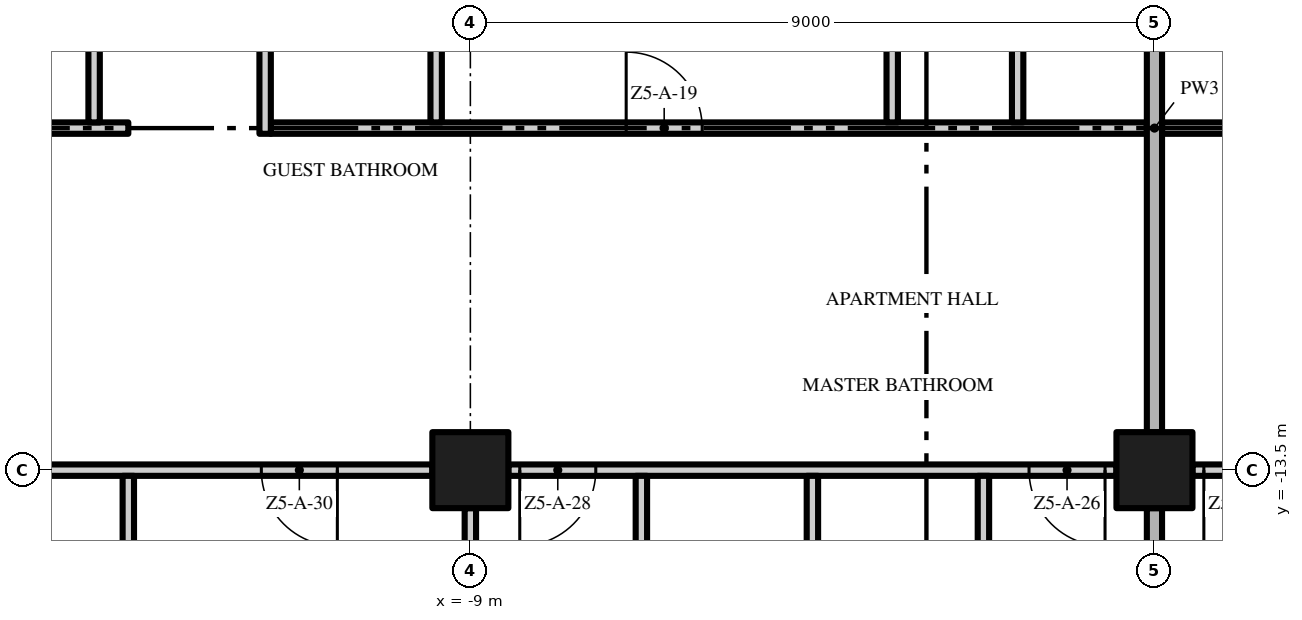
"""IFC4 building model, lengths in metres.
Left out: names, types, materials, properties, quantities, classifications, styles, units other than length and angle.
Written with IfcOpenShell. Run it as: python <this file> out.ifc"""

import sys

from ifc_helpers import new_model, si_unit, direction, frame, frame_2d, origin, origin_2d, place, context, subcontext, project, spatial, rectangle, extrude, element, fill, save


model = new_model("IFC4")
c1 = context("Model", 3, precision=1e-05, world=origin(), true_north=direction((0.0, 1.0)))
c2 = subcontext(c1, "Body", "Model", "MODEL_VIEW")
j1 = project(units=[si_unit("LENGTHUNIT", "METRE"), si_unit("PLANEANGLEUNIT", "RADIAN")], contexts=[c1])
p1 = place(None, origin())
s1 = spatial("IfcSite", under=j1, at=p1, CompositionType="ELEMENT")
p2 = place(p1, origin())
s2 = spatial("IfcBuilding", under=s1, at=p2, CompositionType="ELEMENT")
p3 = place(p2, frame((0.0, 0.0, 242.6)))
s3 = spatial("IfcBuildingStorey", under=s2, at=p3, CompositionType="ELEMENT", Elevation=242.6)
for number, where, z_axis, x_axis in (
    (1, (-9.0, -13.5, 0.0), (0.0, 0.0, 1.0), (1.0, 0.0, 0.0)),
    (2, (0.0, -13.5, 0.0), (0.0, 0.0, 1.0), (1.0, 0.0, 0.0)),
):
    element("IfcColumn", number, at=place(p3, frame(where, z_axis=z_axis, x_axis=x_axis)), inside=s3, PredefinedType="COLUMN", context=c2, shape_type="SweptSolid", body=[
        extrude(rectangle(XDim=1.0, YDim=1.0, at=origin_2d()), origin(), (0.0, 0.0, 1.0), 3.5),
    ])
p4 = place(p3, frame((-9.5, -13.5, 0.0), z_axis=(0.0, 0.0, 1.0), x_axis=(-1.0, 0.0, 0.0)))
e3 = element("IfcWall", 3, at=p4, inside=s3, PredefinedType="PARTITIONING", context=c2, shape_type="SweptSolid", body=[
    extrude(rectangle(XDim=8.0, YDim=0.15, at=frame_2d((4.0, 0.0))), origin(), (0.0, 0.0, 1.0), 3.5),
])
p5 = place(p4, frame((1.25, 0.0, 0.0)))
e4 = element("IfcOpeningElement", 4, at=p5, cuts=e3, PredefinedType="OPENING", context=c2, shape_type="SweptSolid", body=[
    extrude(rectangle(XDim=1.0, YDim=2.4, at=frame_2d((0.5, 1.2))), frame((0.0, 0.085, 0.0), z_axis=(0.0, -1.0, 0.0), x_axis=(1.0, 0.0, 0.0)), (0.0, 0.0, 1.0), 0.17),
])
p6 = place(p4, frame((6.85, 0.0, 0.0)))
e5 = element("IfcOpeningElement", 5, at=p6, cuts=e3, PredefinedType="OPENING", context=c2, shape_type="SweptSolid", body=[
    extrude(rectangle(XDim=1.0, YDim=2.4, at=frame_2d((0.5, 1.2))), frame((0.0, 0.085, 0.0), z_axis=(0.0, -1.0, 0.0), x_axis=(1.0, 0.0, 0.0)), (0.0, 0.0, 1.0), 0.17),
])
p7 = place(p3, frame((-0.5, -13.5, 0.0), z_axis=(0.0, 0.0, 1.0), x_axis=(-1.0, 0.0, 0.0)))
e6 = element("IfcWall", 6, at=p7, inside=s3, PredefinedType="PARTITIONING", context=c2, shape_type="SweptSolid", body=[
    extrude(rectangle(XDim=8.0, YDim=0.15, at=frame_2d((4.0, 0.0))), origin(), (0.0, 0.0, 1.0), 3.5),
])
p8 = place(p7, frame((0.15, 0.0, 0.0)))
e7 = element("IfcOpeningElement", 7, at=p8, cuts=e6, PredefinedType="OPENING", context=c2, shape_type="SweptSolid", body=[
    extrude(rectangle(XDim=1.0, YDim=2.4, at=frame_2d((0.5, 1.2))), frame((0.0, 0.085, 0.0), z_axis=(0.0, -1.0, 0.0), x_axis=(1.0, 0.0, 0.0)), (0.0, 0.0, 1.0), 0.17),
])
p9 = place(p7, frame((6.85, 0.0, 0.0)))
e8 = element("IfcOpeningElement", 8, at=p9, cuts=e6, PredefinedType="OPENING", context=c2, shape_type="SweptSolid", body=[
    extrude(rectangle(XDim=1.0, YDim=2.4, at=frame_2d((0.5, 1.2))), frame((0.0, 0.085, 0.0), z_axis=(0.0, -1.0, 0.0), x_axis=(1.0, 0.0, 0.0)), (0.0, 0.0, 1.0), 0.17),
])
p10 = place(p3, frame((8.5, -13.5, 0.0), z_axis=(0.0, 0.0, 1.0), x_axis=(-1.0, 0.0, 0.0)))
e9 = element("IfcWall", 9, at=p10, inside=s3, PredefinedType="PARTITIONING", context=c2, shape_type="SweptSolid", body=[
    extrude(rectangle(XDim=8.0, YDim=0.15, at=frame_2d((4.0, 0.0))), origin(), (0.0, 0.0, 1.0), 3.5),
])
p11 = place(p10, frame((1.25, 0.0, 0.0)))
e10 = element("IfcOpeningElement", 10, at=p11, cuts=e9, PredefinedType="OPENING", context=c2, shape_type="SweptSolid", body=[
    extrude(rectangle(XDim=1.0, YDim=2.4, at=frame_2d((0.5, 1.2))), frame((0.0, 0.085, 0.0), z_axis=(0.0, -1.0, 0.0), x_axis=(1.0, 0.0, 0.0)), (0.0, 0.0, 1.0), 0.17),
])
p12 = place(p10, frame((6.85, 0.0, 0.0)))
e11 = element("IfcOpeningElement", 11, at=p12, cuts=e9, PredefinedType="OPENING", context=c2, shape_type="SweptSolid", body=[
    extrude(rectangle(XDim=1.0, YDim=2.4, at=frame_2d((0.5, 1.2))), frame((0.0, 0.085, 0.0), z_axis=(0.0, -1.0, 0.0), x_axis=(1.0, 0.0, 0.0)), (0.0, 0.0, 1.0), 0.17),
])
p13 = place(p3, frame((-26.7, -9.0, 0.0), z_axis=(0.0, 0.0, 1.0), x_axis=(1.0, 0.0, 0.0)))
e12 = element("IfcWall", 12, at=p13, inside=s3, PredefinedType="PARTITIONING", context=c2, shape_type="SweptSolid", body=[
    extrude(rectangle(XDim=13.2, YDim=0.15, at=frame_2d((6.6, 0.0))), origin(), (0.0, 0.0, 1.0), 3.5),
])
p14 = place(p3, frame((-11.625, -9.0, 0.0), z_axis=(0.0, 0.0, 1.0), x_axis=(1.0, 0.0, 0.0)))
e13 = element("IfcWall", 13, at=p14, inside=s3, PredefinedType="PARTITIONING", context=c2, shape_type="SweptSolid", body=[
    extrude(rectangle(XDim=11.525, YDim=0.15, at=frame_2d((5.763, 0.0))), origin(), (0.0, 0.0, 1.0), 3.5),
])
p15 = place(p14, frame((4.675, 0.0, 0.0)))
e14 = element("IfcOpeningElement", 14, at=p15, cuts=e13, PredefinedType="OPENING", context=c2, shape_type="SweptSolid", body=[
    extrude(rectangle(XDim=1.0, YDim=2.4, at=frame_2d((0.5, 1.2))), frame((0.0, 0.085, 0.0), z_axis=(0.0, -1.0, 0.0), x_axis=(1.0, 0.0, 0.0)), (0.0, 0.0, 1.0), 0.17),
])
p16 = place(p3, frame((0.1, -9.0, 0.0), z_axis=(0.0, 0.0, 1.0), x_axis=(1.0, 0.0, 0.0)))
e15 = element("IfcWall", 15, at=p16, inside=s3, PredefinedType="PARTITIONING", context=c2, shape_type="SweptSolid", body=[
    extrude(rectangle(XDim=8.825, YDim=0.15, at=frame_2d((4.412, 0.0))), origin(), (0.0, 0.0, 1.0), 3.5),
])
p17 = place(p16, frame((5.8, 0.0, 0.0)))
e16 = element("IfcOpeningElement", 16, at=p17, cuts=e15, PredefinedType="OPENING", context=c2, shape_type="SweptSolid", body=[
    extrude(rectangle(XDim=0.9, YDim=2.1, at=frame_2d((0.45, 1.05))), frame((0.0, 0.085, 0.0), z_axis=(0.0, -1.0, 0.0), x_axis=(1.0, 0.0, 0.0)), (0.0, 0.0, 1.0), 0.17),
])
p18 = place(p3, frame((-13.95, -8.925, 0.0), z_axis=(0.0, 0.0, 1.0), x_axis=(0.0, 1.0, 0.0)))
e17 = element("IfcWall", 17, at=p18, inside=s3, PredefinedType="PARTITIONING", context=c2, shape_type="SweptSolid", body=[
    extrude(rectangle(XDim=4.5, YDim=0.15, at=frame_2d((2.25, 0.0))), origin(), (0.0, 0.0, 1.0), 3.5),
])
p19 = place(p3, frame((-13.5, -22.2, 0.0), z_axis=(0.0, 0.0, 1.0), x_axis=(0.0, 1.0, 0.0)))
e18 = element("IfcWall", 18, at=p19, inside=s3, PredefinedType="PARTITIONING", context=c2, shape_type="SweptSolid", body=[
    extrude(rectangle(XDim=8.625, YDim=0.15, at=frame_2d((4.312, 0.0))), origin(), (0.0, 0.0, 1.0), 3.5),
])
p20 = place(p3, frame((-11.7, -4.425, 0.0), z_axis=(0.0, 0.0, 1.0), x_axis=(0.0, -1.0, 0.0)))
e19 = element("IfcWall", 19, at=p20, inside=s3, PredefinedType="PARTITIONING", context=c2, shape_type="SweptSolid", body=[
    extrude(rectangle(XDim=4.65, YDim=0.15, at=frame_2d((2.325, 0.0))), origin(), (0.0, 0.0, 1.0), 3.5),
])
p21 = place(p20, frame((1.875, 0.0, 0.0)))
e20 = element("IfcOpeningElement", 20, at=p21, cuts=e19, PredefinedType="OPENING", context=c2, shape_type="SweptSolid", body=[
    extrude(rectangle(XDim=0.9, YDim=2.1, at=frame_2d((0.45, 1.05))), frame((0.0, 0.085, 0.0), z_axis=(0.0, -1.0, 0.0), x_axis=(1.0, 0.0, 0.0)), (0.0, 0.0, 1.0), 0.17),
])
p22 = place(p3, frame((-9.45, -8.925, 0.0), z_axis=(0.0, 0.0, 1.0), x_axis=(0.0, 1.0, 0.0)))
e21 = element("IfcWall", 21, at=p22, inside=s3, PredefinedType="PARTITIONING", context=c2, shape_type="SweptSolid", body=[
    extrude(rectangle(XDim=3.925, YDim=0.15, at=frame_2d((1.962, 0.0))), origin(), (0.0, 0.0, 1.0), 3.5),
])
p23 = place(p3, frame((-9.0, -21.6, 0.0), z_axis=(0.0, 0.0, 1.0), x_axis=(0.0, 1.0, 0.0)))
e22 = element("IfcWall", 22, at=p23, inside=s3, PredefinedType="PARTITIONING", context=c2, shape_type="SweptSolid", body=[
    extrude(rectangle(XDim=7.6, YDim=0.15, at=frame_2d((3.8, 0.0))), origin(), (0.0, 0.0, 1.0), 3.5),
])
p24 = place(p3, frame((-6.75, -16.575, 0.0), z_axis=(0.0, 0.0, 1.0), x_axis=(0.0, 1.0, 0.0)))
e23 = element("IfcWall", 23, at=p24, inside=s3, PredefinedType="PARTITIONING", context=c2, shape_type="SweptSolid", body=[
    extrude(rectangle(XDim=3.0, YDim=0.15, at=frame_2d((1.5, 0.0))), origin(), (0.0, 0.0, 1.0), 3.5),
])
p25 = place(p3, frame((-4.5, -22.2, 0.0), z_axis=(0.0, 0.0, 1.0), x_axis=(0.0, 1.0, 0.0)))
e24 = element("IfcWall", 24, at=p25, inside=s3, PredefinedType="PARTITIONING", context=c2, shape_type="SweptSolid", body=[
    extrude(rectangle(XDim=8.625, YDim=0.15, at=frame_2d((4.312, 0.0))), origin(), (0.0, 0.0, 1.0), 3.5),
])
p26 = place(p3, frame((-3.45, -8.925, 0.0), z_axis=(0.0, 0.0, 1.0), x_axis=(0.0, 1.0, 0.0)))
e25 = element("IfcWall", 25, at=p26, inside=s3, PredefinedType="PARTITIONING", context=c2, shape_type="SweptSolid", body=[
    extrude(rectangle(XDim=4.35, YDim=0.15, at=frame_2d((2.175, 0.0))), origin(), (0.0, 0.0, 1.0), 3.5),
])
p27 = place(p3, frame((-2.25, -16.575, 0.0), z_axis=(0.0, 0.0, 1.0), x_axis=(0.0, 1.0, 0.0)))
e26 = element("IfcWall", 26, at=p27, inside=s3, PredefinedType="PARTITIONING", context=c2, shape_type="SweptSolid", body=[
    extrude(rectangle(XDim=3.0, YDim=0.15, at=frame_2d((1.5, 0.0))), origin(), (0.0, 0.0, 1.0), 3.5),
])
p28 = place(p3, frame((-1.8, -8.925, 0.0), z_axis=(0.0, 0.0, 1.0), x_axis=(0.0, 1.0, 0.0)))
e27 = element("IfcWall", 27, at=p28, inside=s3, PredefinedType="PARTITIONING", context=c2, shape_type="SweptSolid", body=[
    extrude(rectangle(XDim=4.35, YDim=0.15, at=frame_2d((2.175, 0.0))), origin(), (0.0, 0.0, 1.0), 3.5),
])
p29 = place(p3, frame((0.0, -21.6, 0.0), z_axis=(0.0, 0.0, 1.0), x_axis=(0.0, 1.0, 0.0)))
e28 = element("IfcWall", 28, at=p29, inside=s3, PredefinedType="PARTITIONING", context=c2, shape_type="SweptSolid", body=[
    extrude(rectangle(XDim=7.6, YDim=0.2, at=frame_2d((3.8, 0.0))), origin(), (0.0, 0.0, 1.0), 3.5),
])
p30 = place(p3, frame((0.0, -13.0, 0.0), z_axis=(0.0, 0.0, 1.0), x_axis=(0.0, 1.0, 0.0)))
e29 = element("IfcWall", 29, at=p30, inside=s3, PredefinedType="PARTITIONING", context=c2, shape_type="SweptSolid", body=[
    extrude(rectangle(XDim=8.0, YDim=0.2, at=frame_2d((4.0, 0.0))), origin(), (0.0, 0.0, 1.0), 3.5),
])
p31 = place(p15, origin())
e30 = element("IfcDoor", 30, at=p31, inside=s3, OperationType="SINGLE_SWING_LEFT", PredefinedType="DOOR", context=c2, shape_type="SweptSolid", body=[
    extrude(rectangle(XDim=1.0, YDim=2.4, at=frame_2d((0.5, 1.2))), frame((0.0, 0.025, 0.0), z_axis=(0.0, -1.0, 0.0), x_axis=(1.0, 0.0, 0.0)), (0.0, 0.0, 1.0), 0.05),
])
fill(e14, e30)
p32 = place(p8, origin())
e31 = element("IfcDoor", 31, at=p32, inside=s3, OperationType="SINGLE_SWING_LEFT", PredefinedType="DOOR", context=c2, shape_type="SweptSolid", body=[
    extrude(rectangle(XDim=1.0, YDim=2.4, at=frame_2d((0.5, 1.2))), frame((0.0, 0.025, 0.0), z_axis=(0.0, -1.0, 0.0), x_axis=(1.0, 0.0, 0.0)), (0.0, 0.0, 1.0), 0.05),
])
fill(e7, e31)
p33 = place(p9, origin())
e32 = element("IfcDoor", 32, at=p33, inside=s3, OperationType="SINGLE_SWING_RIGHT", PredefinedType="DOOR", context=c2, shape_type="SweptSolid", body=[
    extrude(rectangle(XDim=1.0, YDim=2.4, at=frame_2d((0.5, 1.2))), frame((0.0, 0.025, 0.0), z_axis=(0.0, -1.0, 0.0), x_axis=(1.0, 0.0, 0.0)), (0.0, 0.0, 1.0), 0.05),
])
fill(e8, e32)
p34 = place(p5, origin())
e33 = element("IfcDoor", 33, at=p34, inside=s3, OperationType="SINGLE_SWING_LEFT", PredefinedType="DOOR", context=c2, shape_type="SweptSolid", body=[
    extrude(rectangle(XDim=1.0, YDim=2.4, at=frame_2d((0.5, 1.2))), frame((0.0, 0.025, 0.0), z_axis=(0.0, -1.0, 0.0), x_axis=(1.0, 0.0, 0.0)), (0.0, 0.0, 1.0), 0.05),
])
fill(e4, e33)
p35 = place(p12, origin())
e34 = element("IfcDoor", 34, at=p35, inside=s3, OperationType="SINGLE_SWING_RIGHT", PredefinedType="DOOR", context=c2, shape_type="SweptSolid", body=[
    extrude(rectangle(XDim=1.0, YDim=2.4, at=frame_2d((0.5, 1.2))), frame((0.0, 0.025, 0.0), z_axis=(0.0, -1.0, 0.0), x_axis=(1.0, 0.0, 0.0)), (0.0, 0.0, 1.0), 0.05),
])
fill(e11, e34)
save(model, sys.argv[1])
